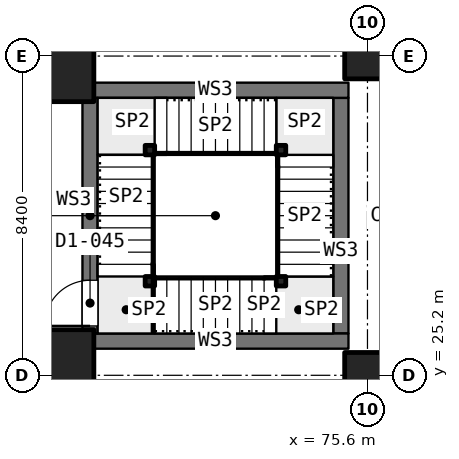
"""IFC4 building model, lengths in metres.
Left out: names, types, materials, properties, quantities, classifications, styles, units other than length and angle.
Written with IfcOpenShell. Run it as: python <this file> out.ifc"""

import sys

from ifc_helpers import new_model, si_unit, direction, frame, frame_2d, origin, origin_2d, place, context, subcontext, project, spatial, rectangle, extrude, element, fill, save


model = new_model("IFC4")
c1 = context("Model", 3, precision=1e-05, world=origin(), true_north=direction((0.0, 1.0)))
c2 = subcontext(c1, "Body", "Model", "MODEL_VIEW")
j1 = project(units=[si_unit("LENGTHUNIT", "METRE"), si_unit("PLANEANGLEUNIT", "RADIAN")], contexts=[c1])
p1 = place(None, origin())
s1 = spatial("IfcSite", under=j1, at=p1, CompositionType="ELEMENT")
p2 = place(p1, origin())
s2 = spatial("IfcBuilding", under=s1, at=p2, CompositionType="ELEMENT")
p3 = place(p2, frame((0.0, 0.0, 15.4)))
s3 = spatial("IfcBuildingStorey", under=s2, at=p3, CompositionType="ELEMENT", Elevation=15.4)
for number, where, z_axis, x_axis in (
    (1, (67.2, 25.2, 0.0), (0.0, 0.0, 1.0), (1.0, 0.0, 0.0)),
    (2, (67.2, 33.6, 0.0), (0.0, 0.0, 1.0), (1.0, 0.0, 0.0)),
):
    element("IfcColumn", number, at=place(p3, frame(where, z_axis=z_axis, x_axis=x_axis)), inside=s3, PredefinedType="COLUMN", context=c2, shape_type="SweptSolid", body=[
        extrude(rectangle(XDim=2.4, YDim=2.4, at=origin_2d()), origin(), (0.0, 0.0, 1.0), 5.0),
    ])
for number, where, z_axis, x_axis in (
    (3, (75.6, 25.2, 0.0), (0.0, 0.0, 1.0), (1.0, 0.0, 0.0)),
    (4, (75.6, 33.6, 0.0), (0.0, 0.0, 1.0), (1.0, 0.0, 0.0)),
):
    element("IfcColumn", number, at=place(p3, frame(where, z_axis=z_axis, x_axis=x_axis)), inside=s3, PredefinedType="COLUMN", context=c2, shape_type="SweptSolid", body=[
        extrude(rectangle(XDim=1.2, YDim=1.2, at=origin_2d()), origin(), (0.0, 0.0, 1.0), 5.0),
    ])
for number, where, z_axis, x_axis in (
    (5, (68.1, 26.1, 0.0), (0.0, 0.0, 1.0), (1.0, 0.0, 0.0)),
    (6, (68.1, 32.7, 0.0), (0.0, 0.0, 1.0), (1.0, 0.0, 0.0)),
):
    element("IfcWall", number, at=place(p3, frame(where, z_axis=z_axis, x_axis=x_axis)), inside=s3, PredefinedType="SOLIDWALL", context=c2, shape_type="SweptSolid", body=[
        extrude(rectangle(XDim=7.0, YDim=0.4, at=frame_2d((3.5, 0.0))), origin(), (0.0, 0.0, 1.0), 4.7),
    ])
p4 = place(p3, frame((68.3, 26.3, 0.0), z_axis=(0.0, 0.0, 1.0), x_axis=(0.0, 1.0, 0.0)))
e7 = element("IfcWall", 7, at=p4, inside=s3, PredefinedType="SOLIDWALL", context=c2, shape_type="SweptSolid", body=[
    extrude(rectangle(XDim=6.2, YDim=0.4, at=frame_2d((3.1, 0.0))), origin(), (0.0, 0.0, 1.0), 4.7),
])
p5 = place(p4, frame((0.2, 0.0, 0.0)))
e8 = element("IfcOpeningElement", 8, at=p5, cuts=e7, PredefinedType="OPENING", context=c2, shape_type="SweptSolid", body=[
    extrude(rectangle(XDim=1.2, YDim=2.1, at=frame_2d((0.6, 1.05))), frame((0.0, 0.21, 0.0), z_axis=(0.0, -1.0, 0.0), x_axis=(1.0, 0.0, 0.0)), (0.0, 0.0, 1.0), 0.42),
])
p6 = place(p3, frame((74.9, 26.3, 0.0), z_axis=(0.0, 0.0, 1.0), x_axis=(0.0, 1.0, 0.0)))
e9 = element("IfcWall", 9, at=p6, inside=s3, PredefinedType="SOLIDWALL", context=c2, shape_type="SweptSolid", body=[
    extrude(rectangle(XDim=6.2, YDim=0.4, at=frame_2d((3.1, 0.0))), origin(), (0.0, 0.0, 1.0), 4.7),
])
for number, where, z_axis, x_axis in (
    (10, (69.875, 27.675, 0.0), (0.0, 0.0, 1.0), (1.0, 0.0, 0.0)),
    (11, (73.325, 27.675, 0.0), (0.0, 0.0, 1.0), (1.0, 0.0, 0.0)),
    (12, (73.325, 31.125, 0.0), (0.0, 0.0, 1.0), (1.0, 0.0, 0.0)),
    (13, (69.875, 31.125, 0.0), (0.0, 0.0, 1.0), (1.0, 0.0, 0.0)),
):
    element("IfcColumn", number, at=place(p3, frame(where, z_axis=z_axis, x_axis=x_axis)), inside=s3, PredefinedType="COLUMN", context=c2, shape_type="SweptSolid", body=[
        extrude(rectangle(XDim=0.25, YDim=0.25, at=origin_2d()), origin(), (0.0, 0.0, 1.0), 5.0),
    ])
p7 = place(p5, origin())
e14 = element("IfcDoor", 14, at=p7, inside=s3, OperationType="SINGLE_SWING_RIGHT", PredefinedType="DOOR", context=c2, shape_type="SweptSolid", body=[
    extrude(rectangle(XDim=1.2, YDim=2.1, at=frame_2d((0.6, 1.05))), frame((0.0, 0.025, 0.0), z_axis=(0.0, -1.0, 0.0), x_axis=(1.0, 0.0, 0.0)), (0.0, 0.0, 1.0), 0.05),
])
fill(e8, e14)
save(model, sys.argv[1])
